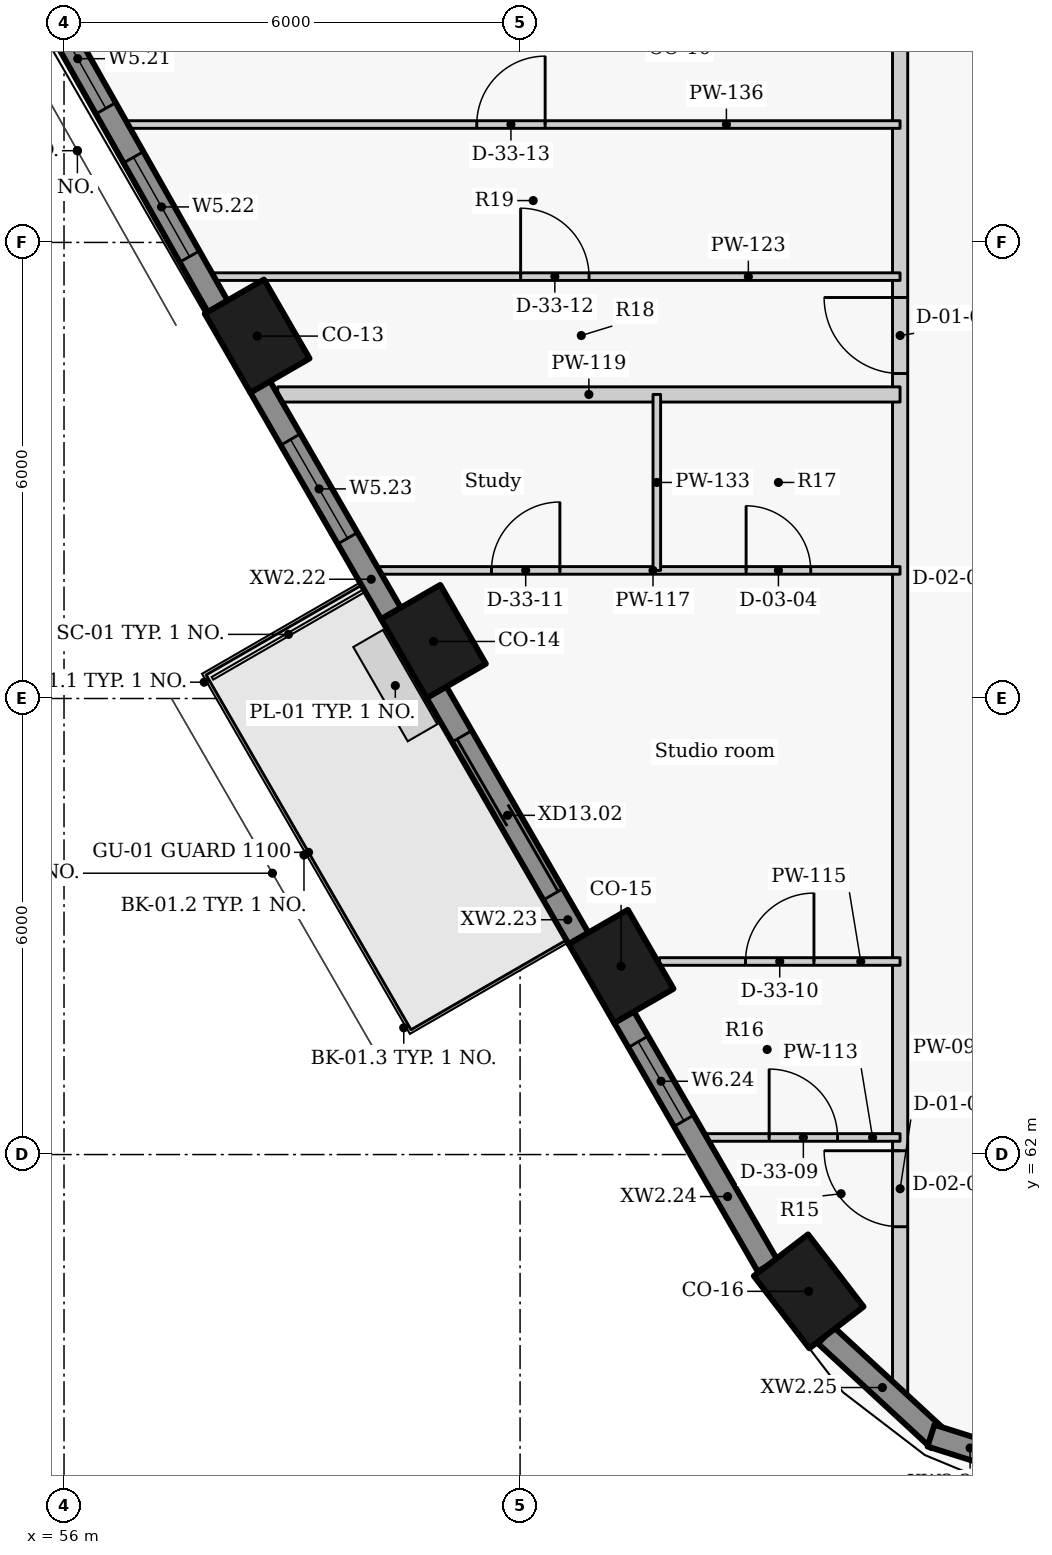
"""IFC4 building model, lengths in metres.
Left out: names, types, materials, properties, quantities, classifications, styles, units other than length and angle.
Written with IfcOpenShell. Run it as: python <this file> out.ifc"""

import sys

from ifc_helpers import new_model, si_unit, direction, frame, frame_2d, origin, origin_2d, place, context, subcontext, project, spatial, rectangle, extrude, element, fill, save


model = new_model("IFC4")
c1 = context("Model", 3, precision=1e-05, world=origin(), true_north=direction((0.0, 1.0)))
c2 = subcontext(c1, "Body", "Model", "MODEL_VIEW")
j1 = project(units=[si_unit("LENGTHUNIT", "METRE"), si_unit("PLANEANGLEUNIT", "RADIAN")], contexts=[c1])
p1 = place(None, origin())
s1 = spatial("IfcSite", under=j1, at=p1, CompositionType="ELEMENT")
p2 = place(p1, origin())
s2 = spatial("IfcBuilding", under=s1, at=p2, CompositionType="ELEMENT")
p3 = place(p2, frame((0.0, 0.0, 180.0)))
s3 = spatial("IfcBuildingStorey", under=s2, at=p3, CompositionType="ELEMENT", Elevation=180.0)
for number, where, z_axis, x_axis in (
    (1, (58.541, 72.768, 0.0), (0.0, 0.0, 1.0), (0.5, -0.866, 0.0)),
    (2, (60.861, 68.75, 0.0), (0.0, 0.0, 1.0), (0.5, -0.866, 0.0)),
    (3, (63.329, 64.475, 0.0), (0.0, 0.0, 1.0), (0.5, -0.866, 0.0)),
    (4, (65.797, 60.2, 0.0), (0.0, 0.0, 1.0), (0.609, -0.793, 0.0)),
):
    element("IfcColumn", number, at=place(p3, frame(where, z_axis=z_axis, x_axis=x_axis)), inside=s3, PredefinedType="COLUMN", context=c2, shape_type="SweptSolid", body=[
        extrude(rectangle(XDim=1.2, YDim=0.9, at=origin_2d()), origin(), (0.0, 0.0, 1.0), 3.3),
    ])
p4 = place(p3, frame((55.373, 77.846, 0.0), z_axis=(0.0, 0.0, 1.0), x_axis=(0.492033360928, -0.870576344575, 0.0)))
e5 = element("IfcWall", 5, at=p4, inside=s3, PredefinedType="SOLIDWALL", context=c2, shape_type="SweptSolid", body=[
    extrude(rectangle(XDim=5.387, YDim=0.3, at=frame_2d((2.693, 0.0))), origin(), (0.0, 0.0, 1.0), 2.425),
])
p5 = place(p4, frame((0.892, 0.0, 0.9)))
e6 = element("IfcOpeningElement", 6, at=p5, cuts=e5, PredefinedType="OPENING", context=c2, shape_type="SweptSolid", body=[
    extrude(rectangle(XDim=1.5, YDim=1.1, at=frame_2d((0.75, 0.55))), frame((0.0, 0.16, 0.0), z_axis=(0.0, -1.0, 0.0), x_axis=(1.0, 0.0, 0.0)), (0.0, 0.0, 1.0), 0.32),
])
p6 = place(p4, frame((3.132, 0.0, 0.9)))
e7 = element("IfcOpeningElement", 7, at=p6, cuts=e5, PredefinedType="OPENING", context=c2, shape_type="SweptSolid", body=[
    extrude(rectangle(XDim=1.5, YDim=1.1, at=frame_2d((0.75, 0.55))), frame((0.0, 0.16, 0.0), z_axis=(0.0, -1.0, 0.0), x_axis=(1.0, 0.0, 0.0)), (0.0, 0.0, 1.0), 0.32),
])
p7 = place(p3, frame((58.579, 72.102, 0.0), z_axis=(0.0, 0.0, 1.0), x_axis=(0.499955427682, -0.866051136095, 0.0)))
e8 = element("IfcWall", 8, at=p7, inside=s3, PredefinedType="SOLIDWALL", context=c2, shape_type="SweptSolid", body=[
    extrude(rectangle(XDim=3.447, YDim=0.3, at=frame_2d((1.724, 0.0))), origin(), (0.0, 0.0, 1.0), 2.425),
])
p8 = place(p7, frame((0.802, 0.0, 0.9)))
e9 = element("IfcOpeningElement", 9, at=p8, cuts=e8, PredefinedType="OPENING", context=c2, shape_type="SweptSolid", body=[
    extrude(rectangle(XDim=1.5, YDim=1.1, at=frame_2d((0.75, 0.55))), frame((0.0, 0.16, 0.0), z_axis=(0.0, -1.0, 0.0), x_axis=(1.0, 0.0, 0.0)), (0.0, 0.0, 1.0), 0.32),
])
p9 = place(p3, frame((60.899, 68.084, 0.0), z_axis=(0.0, 0.0, 1.0), x_axis=(0.500059225181, -0.86599120741, 0.0)))
e10 = element("IfcWall", 10, at=p9, inside=s3, PredefinedType="SOLIDWALL", context=c2, shape_type="SweptSolid", body=[
    extrude(rectangle(XDim=3.744, YDim=0.3, at=frame_2d((1.872, 0.0))), origin(), (0.0, 0.0, 1.0), 2.425),
])
p10 = place(p9, frame((0.672, 0.0, 0.0)))
e11 = element("IfcOpeningElement", 11, at=p10, cuts=e10, PredefinedType="OPENING", context=c2, shape_type="SweptSolid", body=[
    extrude(rectangle(XDim=2.4, YDim=2.0, at=frame_2d((1.2, 1.0))), frame((0.0, 0.16, 0.0), z_axis=(0.0, -1.0, 0.0), x_axis=(1.0, 0.0, 0.0)), (0.0, 0.0, 1.0), 0.32),
])
p11 = place(p3, frame((63.367, 63.809, 0.0), z_axis=(0.0, 0.0, 1.0), x_axis=(0.499961087031, -0.866047869032, 0.0)))
e12 = element("IfcWall", 12, at=p11, inside=s3, PredefinedType="SOLIDWALL", context=c2, shape_type="SweptSolid", body=[
    extrude(rectangle(XDim=3.779, YDim=0.3, at=frame_2d((1.889, 0.0))), origin(), (0.0, 0.0, 1.0), 2.425),
])
p12 = place(p11, frame((0.376, 0.0, 0.9)))
e13 = element("IfcOpeningElement", 13, at=p12, cuts=e12, PredefinedType="OPENING", context=c2, shape_type="SweptSolid", body=[
    extrude(rectangle(XDim=1.2, YDim=1.1, at=frame_2d((0.6, 0.55))), frame((0.0, 0.16, 0.0), z_axis=(0.0, -1.0, 0.0), x_axis=(1.0, 0.0, 0.0)), (0.0, 0.0, 1.0), 0.32),
])
p13 = place(p3, frame((66.022, 59.622, 0.0), z_axis=(0.0, 0.0, 1.0), x_axis=(0.734627852992, -0.678470277616, 0.0)))
e14 = element("IfcWall", 14, at=p13, inside=s3, PredefinedType="SOLIDWALL", context=c2, shape_type="SweptSolid", body=[
    extrude(rectangle(XDim=2.026, YDim=0.3, at=frame_2d((1.013, 0.0))), origin(), (0.0, 0.0, 1.0), 2.425),
])
p14 = place(p3, frame((67.406, 58.302, 0.0), z_axis=(0.0, 0.0, 1.0), x_axis=(0.953537608367, -0.301274010545, 0.0)))
e15 = element("IfcWall", 15, at=p14, inside=s3, PredefinedType="SOLIDWALL", context=c2, shape_type="SweptSolid", body=[
    extrude(rectangle(XDim=2.048, YDim=0.3, at=frame_2d((1.024, 0.0))), origin(), (0.0, 0.0, 1.0), 2.425),
])
p15 = place(p14, frame((1.18, 0.0, 0.9)))
e16 = element("IfcOpeningElement", 16, at=p15, cuts=e15, PredefinedType="OPENING", context=c2, shape_type="SweptSolid", body=[
    extrude(rectangle(XDim=0.6, YDim=1.1, at=frame_2d((0.3, 0.55))), frame((0.0, 0.16, 0.0), z_axis=(0.0, -1.0, 0.0), x_axis=(1.0, 0.0, 0.0)), (0.0, 0.0, 1.0), 0.32),
])
p16 = place(p3, frame((67.0, 58.674, 0.0), z_axis=(0.0, 0.0, 1.0), x_axis=(0.0, 1.0, 0.0)))
e17 = element("IfcWall", 17, at=p16, inside=s3, PredefinedType="PARTITIONING", context=c2, shape_type="SweptSolid", body=[
    extrude(rectangle(XDim=42.592, YDim=0.2, at=frame_2d((21.296, 0.0))), origin(), (0.0, 0.0, 1.0), 2.405),
])
p17 = place(p16, frame((2.376, 0.0, 0.0)))
e18 = element("IfcOpeningElement", 18, at=p17, cuts=e17, PredefinedType="OPENING", context=c2, shape_type="SweptSolid", body=[
    extrude(rectangle(XDim=1.0, YDim=2.1, at=frame_2d((0.5, 1.05))), frame((0.0, 0.11, 0.0), z_axis=(0.0, -1.0, 0.0), x_axis=(1.0, 0.0, 0.0)), (0.0, 0.0, 1.0), 0.22),
])
p18 = place(p16, frame((13.601, 0.0, 0.0)))
e19 = element("IfcOpeningElement", 19, at=p18, cuts=e17, PredefinedType="OPENING", context=c2, shape_type="SweptSolid", body=[
    extrude(rectangle(XDim=1.0, YDim=2.1, at=frame_2d((0.5, 1.05))), frame((0.0, 0.11, 0.0), z_axis=(0.0, -1.0, 0.0), x_axis=(1.0, 0.0, 0.0)), (0.0, 0.0, 1.0), 0.22),
])
p19 = place(p16, frame((30.026, 0.0, 0.0)))
e20 = element("IfcOpeningElement", 20, at=p19, cuts=e17, PredefinedType="OPENING", context=c2, shape_type="SweptSolid", body=[
    extrude(rectangle(XDim=1.0, YDim=2.1, at=frame_2d((0.5, 1.05))), frame((0.0, 0.11, 0.0), z_axis=(0.0, -1.0, 0.0), x_axis=(1.0, 0.0, 0.0)), (0.0, 0.0, 1.0), 0.22),
])
p20 = place(p16, frame((36.457, 0.0, 0.0)))
e21 = element("IfcOpeningElement", 21, at=p20, cuts=e17, PredefinedType="OPENING", context=c2, shape_type="SweptSolid", body=[
    extrude(rectangle(XDim=1.0, YDim=2.1, at=frame_2d((0.5, 1.05))), frame((0.0, 0.11, 0.0), z_axis=(0.0, -1.0, 0.0), x_axis=(1.0, 0.0, 0.0)), (0.0, 0.0, 1.0), 0.22),
])
p21 = place(p3, frame((64.455, 62.225, 0.0), z_axis=(0.0, 0.0, 1.0), x_axis=(1.0, 0.0, 0.0)))
e22 = element("IfcWall", 22, at=p21, inside=s3, PredefinedType="PARTITIONING", context=c2, shape_type="SweptSolid", body=[
    extrude(rectangle(XDim=2.544, YDim=0.1, at=frame_2d((1.272, 0.0))), origin(), (0.0, 0.0, 1.0), 2.405),
])
p22 = place(p21, frame((0.822, 0.0, 0.0)))
e23 = element("IfcOpeningElement", 23, at=p22, cuts=e22, PredefinedType="OPENING", context=c2, shape_type="SweptSolid", body=[
    extrude(rectangle(XDim=0.9, YDim=2.1, at=frame_2d((0.45, 1.05))), frame((0.0, 0.06, 0.0), z_axis=(0.0, -1.0, 0.0), x_axis=(1.0, 0.0, 0.0)), (0.0, 0.0, 1.0), 0.12),
])
p23 = place(p3, frame((63.834, 64.54, 0.0), z_axis=(0.0, 0.0, 1.0), x_axis=(1.0, 0.0, 0.0)))
e24 = element("IfcWall", 24, at=p23, inside=s3, PredefinedType="PARTITIONING", context=c2, shape_type="SweptSolid", body=[
    extrude(rectangle(XDim=3.165, YDim=0.1, at=frame_2d((1.583, 0.0))), origin(), (0.0, 0.0, 1.0), 3.025),
])
p24 = place(p23, frame((1.132, 0.0, 0.0)))
e25 = element("IfcOpeningElement", 25, at=p24, cuts=e24, PredefinedType="OPENING", context=c2, shape_type="SweptSolid", body=[
    extrude(rectangle(XDim=0.9, YDim=2.1, at=frame_2d((0.45, 1.05))), frame((0.0, 0.06, 0.0), z_axis=(0.0, -1.0, 0.0), x_axis=(1.0, 0.0, 0.0)), (0.0, 0.0, 1.0), 0.12),
])
p25 = place(p3, frame((60.148, 69.685, 0.0), z_axis=(0.0, 0.0, 1.0), x_axis=(1.0, 0.0, 0.0)))
e26 = element("IfcWall", 26, at=p25, inside=s3, PredefinedType="PARTITIONING", context=c2, shape_type="SweptSolid", body=[
    extrude(rectangle(XDim=6.851, YDim=0.1, at=frame_2d((3.426, 0.0))), origin(), (0.0, 0.0, 1.0), 2.405),
])
p26 = place(p25, frame((4.826, 0.0, 0.0)))
e27 = element("IfcOpeningElement", 27, at=p26, cuts=e26, PredefinedType="OPENING", context=c2, shape_type="SweptSolid", body=[
    extrude(rectangle(XDim=0.85, YDim=2.1, at=frame_2d((0.425, 1.05))), frame((0.0, 0.06, 0.0), z_axis=(0.0, -1.0, 0.0), x_axis=(1.0, 0.0, 0.0)), (0.0, 0.0, 1.0), 0.12),
])
p27 = place(p25, frame((1.476, 0.0, 0.0)))
e28 = element("IfcOpeningElement", 28, at=p27, cuts=e26, PredefinedType="OPENING", context=c2, shape_type="SweptSolid", body=[
    extrude(rectangle(XDim=0.9, YDim=2.1, at=frame_2d((0.45, 1.05))), frame((0.0, 0.06, 0.0), z_axis=(0.0, -1.0, 0.0), x_axis=(1.0, 0.0, 0.0)), (0.0, 0.0, 1.0), 0.12),
])
p28 = place(p3, frame((58.811, 72.0, 0.0), z_axis=(0.0, 0.0, 1.0), x_axis=(1.0, 0.0, 0.0)))
e29 = element("IfcWall", 29, at=p28, inside=s3, PredefinedType="PARTITIONING", context=c2, shape_type="SweptSolid", body=[
    extrude(rectangle(XDim=8.188, YDim=0.2, at=frame_2d((4.094, 0.0))), origin(), (0.0, 0.0, 1.0), 2.405),
])
p29 = place(p3, frame((57.916, 73.55, 0.0), z_axis=(0.0, 0.0, 1.0), x_axis=(1.0, 0.0, 0.0)))
e30 = element("IfcWall", 30, at=p29, inside=s3, PredefinedType="PARTITIONING", context=c2, shape_type="SweptSolid", body=[
    extrude(rectangle(XDim=9.083, YDim=0.1, at=frame_2d((4.542, 0.0))), origin(), (0.0, 0.0, 1.0), 2.405),
])
p30 = place(p29, frame((4.091, 0.0, 0.0)))
e31 = element("IfcOpeningElement", 31, at=p30, cuts=e30, PredefinedType="OPENING", context=c2, shape_type="SweptSolid", body=[
    extrude(rectangle(XDim=0.9, YDim=2.1, at=frame_2d((0.45, 1.05))), frame((0.0, 0.06, 0.0), z_axis=(0.0, -1.0, 0.0), x_axis=(1.0, 0.0, 0.0)), (0.0, 0.0, 1.0), 0.12),
])
p31 = place(p3, frame((63.799, 69.685, 0.0), z_axis=(0.0, 0.0, 1.0), x_axis=(0.0, 1.0, 0.0)))
e32 = element("IfcWall", 32, at=p31, inside=s3, PredefinedType="PARTITIONING", context=c2, shape_type="SweptSolid", body=[
    extrude(rectangle(XDim=2.315, YDim=0.1, at=frame_2d((1.158, 0.0))), origin(), (0.0, 0.0, 1.0), 3.025),
])
p32 = place(p3, frame((56.761, 75.551, 0.0), z_axis=(0.0, 0.0, 1.0), x_axis=(1.0, 0.0, 0.0)))
e33 = element("IfcWall", 33, at=p32, inside=s3, PredefinedType="PARTITIONING", context=c2, shape_type="SweptSolid", body=[
    extrude(rectangle(XDim=10.238, YDim=0.1, at=frame_2d((5.119, 0.0))), origin(), (0.0, 0.0, 1.0), 2.405),
])
p33 = place(p32, frame((4.669, 0.0, 0.0)))
e34 = element("IfcOpeningElement", 34, at=p33, cuts=e33, PredefinedType="OPENING", context=c2, shape_type="SweptSolid", body=[
    extrude(rectangle(XDim=0.9, YDim=2.1, at=frame_2d((0.45, 1.05))), frame((0.0, 0.06, 0.0), z_axis=(0.0, -1.0, 0.0), x_axis=(1.0, 0.0, 0.0)), (0.0, 0.0, 1.0), 0.12),
])
p34 = place(p5, origin())
e35 = element("IfcWindow", 35, at=p34, inside=s3, PartitioningType="SINGLE_PANEL", PredefinedType="WINDOW", context=c2, shape_type="SweptSolid", body=[
    extrude(rectangle(XDim=1.5, YDim=1.1, at=frame_2d((0.75, 0.55))), frame((0.0, 0.03, 0.0), z_axis=(0.0, -1.0, 0.0), x_axis=(1.0, 0.0, 0.0)), (0.0, 0.0, 1.0), 0.06),
])
fill(e6, e35)
p35 = place(p6, origin())
e36 = element("IfcWindow", 36, at=p35, inside=s3, PartitioningType="SINGLE_PANEL", PredefinedType="WINDOW", context=c2, shape_type="SweptSolid", body=[
    extrude(rectangle(XDim=1.5, YDim=1.1, at=frame_2d((0.75, 0.55))), frame((0.0, 0.03, 0.0), z_axis=(0.0, -1.0, 0.0), x_axis=(1.0, 0.0, 0.0)), (0.0, 0.0, 1.0), 0.06),
])
fill(e7, e36)
p36 = place(p8, origin())
e37 = element("IfcWindow", 37, at=p36, inside=s3, PartitioningType="SINGLE_PANEL", PredefinedType="WINDOW", context=c2, shape_type="SweptSolid", body=[
    extrude(rectangle(XDim=1.5, YDim=1.1, at=frame_2d((0.75, 0.55))), frame((0.0, 0.03, 0.0), z_axis=(0.0, -1.0, 0.0), x_axis=(1.0, 0.0, 0.0)), (0.0, 0.0, 1.0), 0.06),
])
fill(e9, e37)
p37 = place(p10, origin())
e38 = element("IfcDoor", 38, at=p37, inside=s3, OperationType="DOUBLE_DOOR_SLIDING", PredefinedType="DOOR", context=c2, shape_type="SweptSolid", body=[
    extrude(rectangle(XDim=2.4, YDim=2.0, at=frame_2d((1.2, 1.0))), frame((0.0, 0.025, 0.0), z_axis=(0.0, -1.0, 0.0), x_axis=(1.0, 0.0, 0.0)), (0.0, 0.0, 1.0), 0.05),
])
fill(e11, e38)
p38 = place(p12, origin())
e39 = element("IfcWindow", 39, at=p38, inside=s3, PartitioningType="SINGLE_PANEL", PredefinedType="WINDOW", context=c2, shape_type="SweptSolid", body=[
    extrude(rectangle(XDim=1.2, YDim=1.1, at=frame_2d((0.6, 0.55))), frame((0.0, 0.03, 0.0), z_axis=(0.0, -1.0, 0.0), x_axis=(1.0, 0.0, 0.0)), (0.0, 0.0, 1.0), 0.06),
])
fill(e13, e39)
p39 = place(p17, origin())
e40 = element("IfcDoor", 40, at=p39, inside=s3, OperationType="SINGLE_SWING_RIGHT", PredefinedType="DOOR", context=c2, shape_type="SweptSolid", body=[
    extrude(rectangle(XDim=1.0, YDim=2.1, at=frame_2d((0.5, 1.05))), frame((0.0, 0.025, 0.0), z_axis=(0.0, -1.0, 0.0), x_axis=(1.0, 0.0, 0.0)), (0.0, 0.0, 1.0), 0.05),
])
fill(e18, e40)
p40 = place(p22, origin())
e41 = element("IfcDoor", 41, at=p40, inside=s3, OperationType="SINGLE_SWING_LEFT", PredefinedType="DOOR", context=c2, shape_type="SweptSolid", body=[
    extrude(rectangle(XDim=0.9, YDim=2.1, at=frame_2d((0.45, 1.05))), frame((0.0, 0.025, 0.0), z_axis=(0.0, -1.0, 0.0), x_axis=(1.0, 0.0, 0.0)), (0.0, 0.0, 1.0), 0.05),
])
fill(e23, e41)
p41 = place(p24, origin())
e42 = element("IfcDoor", 42, at=p41, inside=s3, OperationType="SINGLE_SWING_RIGHT", PredefinedType="DOOR", context=c2, shape_type="SweptSolid", body=[
    extrude(rectangle(XDim=0.9, YDim=2.1, at=frame_2d((0.45, 1.05))), frame((0.0, 0.025, 0.0), z_axis=(0.0, -1.0, 0.0), x_axis=(1.0, 0.0, 0.0)), (0.0, 0.0, 1.0), 0.05),
])
fill(e25, e42)
p42 = place(p26, origin())
e43 = element("IfcDoor", 43, at=p42, inside=s3, OperationType="SINGLE_SWING_LEFT", PredefinedType="DOOR", context=c2, shape_type="SweptSolid", body=[
    extrude(rectangle(XDim=0.85, YDim=2.1, at=frame_2d((0.425, 1.05))), frame((0.0, 0.025, 0.0), z_axis=(0.0, -1.0, 0.0), x_axis=(1.0, 0.0, 0.0)), (0.0, 0.0, 1.0), 0.05),
])
fill(e27, e43)
p43 = place(p27, origin())
e44 = element("IfcDoor", 44, at=p43, inside=s3, OperationType="SINGLE_SWING_RIGHT", PredefinedType="DOOR", context=c2, shape_type="SweptSolid", body=[
    extrude(rectangle(XDim=0.9, YDim=2.1, at=frame_2d((0.45, 1.05))), frame((0.0, 0.025, 0.0), z_axis=(0.0, -1.0, 0.0), x_axis=(1.0, 0.0, 0.0)), (0.0, 0.0, 1.0), 0.05),
])
fill(e28, e44)
p44 = place(p18, origin())
e45 = element("IfcDoor", 45, at=p44, inside=s3, OperationType="SINGLE_SWING_RIGHT", PredefinedType="DOOR", context=c2, shape_type="SweptSolid", body=[
    extrude(rectangle(XDim=1.0, YDim=2.1, at=frame_2d((0.5, 1.05))), frame((0.0, 0.025, 0.0), z_axis=(0.0, -1.0, 0.0), x_axis=(1.0, 0.0, 0.0)), (0.0, 0.0, 1.0), 0.05),
])
fill(e19, e45)
p45 = place(p30, origin())
e46 = element("IfcDoor", 46, at=p45, inside=s3, OperationType="SINGLE_SWING_LEFT", PredefinedType="DOOR", context=c2, shape_type="SweptSolid", body=[
    extrude(rectangle(XDim=0.9, YDim=2.1, at=frame_2d((0.45, 1.05))), frame((0.0, 0.025, 0.0), z_axis=(0.0, -1.0, 0.0), x_axis=(1.0, 0.0, 0.0)), (0.0, 0.0, 1.0), 0.05),
])
fill(e31, e46)
p46 = place(p33, origin())
e47 = element("IfcDoor", 47, at=p46, inside=s3, OperationType="SINGLE_SWING_RIGHT", PredefinedType="DOOR", context=c2, shape_type="SweptSolid", body=[
    extrude(rectangle(XDim=0.9, YDim=2.1, at=frame_2d((0.45, 1.05))), frame((0.0, 0.025, 0.0), z_axis=(0.0, -1.0, 0.0), x_axis=(1.0, 0.0, 0.0)), (0.0, 0.0, 1.0), 0.05),
])
fill(e34, e47)
save(model, sys.argv[1])
